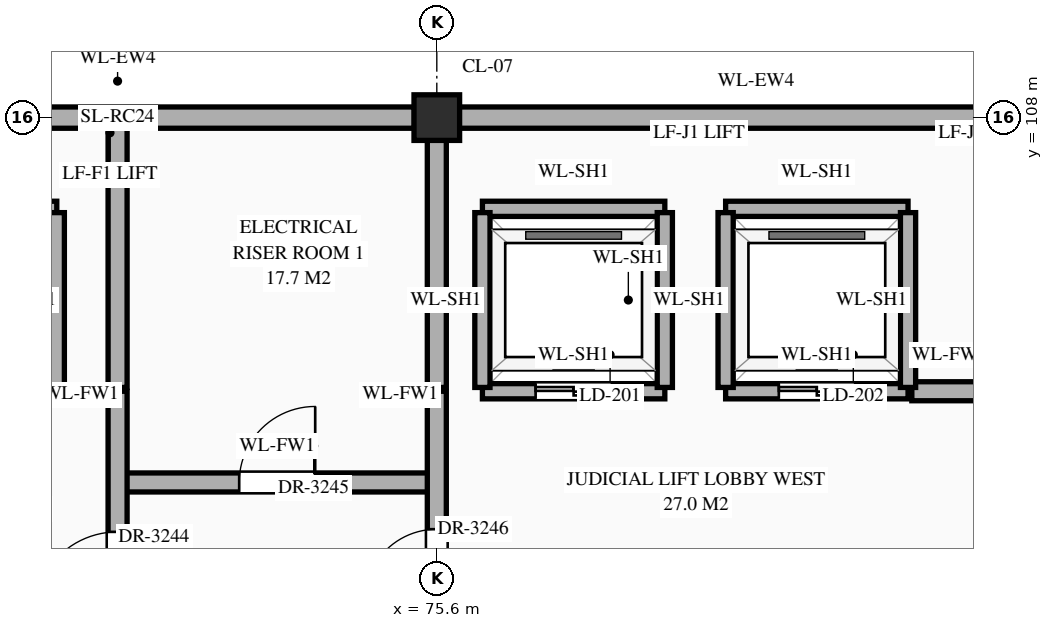
"""IFC4 building model, lengths in metres.
Left out: names, types, materials, properties, quantities, classifications, styles, units other than length and angle.
Written with IfcOpenShell. Run it as: python <this file> out.ifc"""

import sys

from ifc_helpers import new_model, si_unit, direction, frame, frame_2d, origin, origin_2d, place, context, subcontext, project, spatial, rectangle, extrude, element, fill, save


model = new_model("IFC4")
c1 = context("Model", 3, precision=1e-05, world=origin(), true_north=direction((0.0, 1.0)))
c2 = subcontext(c1, "Body", "Model", "MODEL_VIEW")
j1 = project(units=[si_unit("LENGTHUNIT", "METRE"), si_unit("PLANEANGLEUNIT", "RADIAN")], contexts=[c1])
p1 = place(None, origin())
s1 = spatial("IfcSite", under=j1, at=p1, CompositionType="ELEMENT")
p2 = place(p1, origin())
s2 = spatial("IfcBuilding", under=s1, at=p2, CompositionType="ELEMENT")
p3 = place(p2, frame((0.0, 0.0, 60.3)))
s3 = spatial("IfcBuildingStorey", under=s2, at=p3, CompositionType="ELEMENT", Elevation=60.3)
p4 = place(p3, frame((75.6, 108.0, 0.0), z_axis=(0.0, 0.0, 1.0), x_axis=(1.0, 0.0, 0.0)))
e1 = element("IfcColumn", 1, at=p4, inside=s3, PredefinedType="COLUMN", context=c2, shape_type="SweptSolid", body=[
    extrude(rectangle(XDim=0.6, YDim=0.6, at=origin_2d()), origin(), (0.0, 0.0, 1.0), 4.2),
])
p5 = place(p3, frame((67.495, 108.0, 0.0), z_axis=(0.0, 0.0, 1.0), x_axis=(1.0, 0.0, 0.0)))
e2 = element("IfcWall", 2, at=p5, inside=s3, PredefinedType="STANDARD", context=c2, shape_type="SweptSolid", body=[
    extrude(rectangle(XDim=7.81, YDim=0.28, at=frame_2d((3.905, 0.0))), origin(), (0.0, 0.0, 1.0), 3.31),
])
p6 = place(p3, frame((75.895, 108.0, 0.0), z_axis=(0.0, 0.0, 1.0), x_axis=(1.0, 0.0, 0.0)))
e3 = element("IfcWall", 3, at=p6, inside=s3, PredefinedType="STANDARD", context=c2, shape_type="SweptSolid", body=[
    extrude(rectangle(XDim=7.81, YDim=0.28, at=frame_2d((3.905, 0.0))), origin(), (0.0, 0.0, 1.0), 3.31),
])
p7 = place(p3, frame((71.4, 103.2, 0.0), z_axis=(0.0, 0.0, 1.0), x_axis=(1.0, 0.0, 0.0)))
e4 = element("IfcWall", 4, at=p7, inside=s3, PredefinedType="STANDARD", context=c2, shape_type="SweptSolid", body=[
    extrude(rectangle(XDim=4.2, YDim=0.25, at=frame_2d((2.1, 0.0))), origin(), (0.0, 0.0, 1.0), 3.96),
])
p8 = place(p7, frame((1.6, 0.0, 0.0)))
e5 = element("IfcOpeningElement", 5, at=p8, cuts=e4, PredefinedType="OPENING", context=c2, shape_type="SweptSolid", body=[
    extrude(rectangle(XDim=1.0, YDim=2.2, at=frame_2d((0.5, 1.1))), frame((0.0, 0.137, 0.0), z_axis=(0.0, -1.0, 0.0), x_axis=(1.0, 0.0, 0.0)), (0.0, 0.0, 1.0), 0.274),
])
p9 = place(p3, frame((67.6, 104.4, 0.0), z_axis=(0.0, 0.0, 1.0), x_axis=(1.0, 0.0, 0.0)))
e6 = element("IfcWall", 6, at=p9, inside=s3, PredefinedType="STANDARD", context=c2, shape_type="SweptSolid", body=[
    extrude(rectangle(XDim=3.0, YDim=0.2, at=frame_2d((1.5, 0.0))), origin(), (0.0, 0.0, 1.0), 3.96),
])
p10 = place(p9, frame((0.9, 0.0, 0.0)))
e7 = element("IfcOpeningElement", 7, at=p10, cuts=e6, PredefinedType="OPENING", context=c2, shape_type="SweptSolid", body=[
    extrude(rectangle(XDim=1.2, YDim=2.15, at=frame_2d((0.6, 1.075))), frame((0.0, 0.112, 0.0), z_axis=(0.0, -1.0, 0.0), x_axis=(1.0, 0.0, 0.0)), (0.0, 0.0, 1.0), 0.224),
])
p11 = place(p3, frame((76.2, 104.4, 0.0), z_axis=(0.0, 0.0, 1.0), x_axis=(1.0, 0.0, 0.0)))
e8 = element("IfcWall", 8, at=p11, inside=s3, PredefinedType="STANDARD", context=c2, shape_type="SweptSolid", body=[
    extrude(rectangle(XDim=2.4, YDim=0.2, at=frame_2d((1.2, 0.0))), origin(), (0.0, 0.0, 1.0), 3.96),
])
p12 = place(p11, frame((0.7, 0.0, 0.0)))
e9 = element("IfcOpeningElement", 9, at=p12, cuts=e8, PredefinedType="OPENING", context=c2, shape_type="SweptSolid", body=[
    extrude(rectangle(XDim=1.0, YDim=2.15, at=frame_2d((0.5, 1.075))), frame((0.0, 0.112, 0.0), z_axis=(0.0, -1.0, 0.0), x_axis=(1.0, 0.0, 0.0)), (0.0, 0.0, 1.0), 0.224),
])
p13 = place(p3, frame((79.4, 104.4, 0.0), z_axis=(0.0, 0.0, 1.0), x_axis=(1.0, 0.0, 0.0)))
e10 = element("IfcWall", 10, at=p13, inside=s3, PredefinedType="STANDARD", context=c2, shape_type="SweptSolid", body=[
    extrude(rectangle(XDim=2.4, YDim=0.2, at=frame_2d((1.2, 0.0))), origin(), (0.0, 0.0, 1.0), 3.96),
])
p14 = place(p13, frame((0.7, 0.0, 0.0)))
e11 = element("IfcOpeningElement", 11, at=p14, cuts=e10, PredefinedType="OPENING", context=c2, shape_type="SweptSolid", body=[
    extrude(rectangle(XDim=1.0, YDim=2.15, at=frame_2d((0.5, 1.075))), frame((0.0, 0.112, 0.0), z_axis=(0.0, -1.0, 0.0), x_axis=(1.0, 0.0, 0.0)), (0.0, 0.0, 1.0), 0.224),
])
p15 = place(p3, frame((81.85, 104.4, 0.0), z_axis=(0.0, 0.0, 1.0), x_axis=(1.0, 0.0, 0.0)))
e12 = element("IfcWall", 12, at=p15, inside=s3, PredefinedType="STANDARD", context=c2, shape_type="SweptSolid", body=[
    extrude(rectangle(XDim=2.1, YDim=0.25, at=frame_2d((1.05, 0.0))), origin(), (0.0, 0.0, 1.0), 3.96),
])
p16 = place(p3, frame((67.6, 106.8, 0.0), z_axis=(0.0, 0.0, 1.0), x_axis=(1.0, 0.0, 0.0)))
e13 = element("IfcWall", 13, at=p16, inside=s3, PredefinedType="STANDARD", context=c2, shape_type="SweptSolid", body=[
    extrude(rectangle(XDim=3.0, YDim=0.2, at=frame_2d((1.5, 0.0))), origin(), (0.0, 0.0, 1.0), 3.96),
])
for number, where, z_axis, x_axis in (
    (14, (76.2, 106.8, 0.0), (0.0, 0.0, 1.0), (1.0, 0.0, 0.0)),
    (15, (79.4, 106.8, 0.0), (0.0, 0.0, 1.0), (1.0, 0.0, 0.0)),
):
    element("IfcWall", number, at=place(p3, frame(where, z_axis=z_axis, x_axis=x_axis)), inside=s3, PredefinedType="STANDARD", context=c2, shape_type="SweptSolid", body=[
        extrude(rectangle(XDim=2.4, YDim=0.2, at=frame_2d((1.2, 0.0))), origin(), (0.0, 0.0, 1.0), 3.96),
    ])
p17 = place(p3, frame((70.6, 104.45, 0.0), z_axis=(0.0, 0.0, 1.0), x_axis=(0.0, 1.0, 0.0)))
e16 = element("IfcWall", 16, at=p17, inside=s3, PredefinedType="STANDARD", context=c2, shape_type="SweptSolid", body=[
    extrude(rectangle(XDim=2.3, YDim=0.2, at=frame_2d((1.15, 0.0))), origin(), (0.0, 0.0, 1.0), 3.96),
])
p18 = place(p3, frame((71.4, 100.8, 0.0), z_axis=(0.0, 0.0, 1.0), x_axis=(0.0, 1.0, 0.0)))
e17 = element("IfcWall", 17, at=p18, inside=s3, PredefinedType="STANDARD", context=c2, shape_type="SweptSolid", body=[
    extrude(rectangle(XDim=3.6, YDim=0.25, at=frame_2d((1.8, 0.0))), origin(), (0.0, 0.0, 1.0), 3.61),
])
p19 = place(p18, frame((0.65, 0.0, 0.0)))
e18 = element("IfcOpeningElement", 18, at=p19, cuts=e17, PredefinedType="OPENING", context=c2, shape_type="SweptSolid", body=[
    extrude(rectangle(XDim=1.1, YDim=2.2, at=frame_2d((0.55, 1.1))), frame((0.0, 0.137, 0.0), z_axis=(0.0, -1.0, 0.0), x_axis=(1.0, 0.0, 0.0)), (0.0, 0.0, 1.0), 0.274),
])
p20 = place(p3, frame((71.4, 104.45, 0.0), z_axis=(0.0, 0.0, 1.0), x_axis=(0.0, 1.0, 0.0)))
e19 = element("IfcWall", 19, at=p20, inside=s3, PredefinedType="STANDARD", context=c2, shape_type="SweptSolid", body=[
    extrude(rectangle(XDim=3.46, YDim=0.25, at=frame_2d((1.73, 0.0))), origin(), (0.0, 0.0, 1.0), 3.61),
])
p21 = place(p3, frame((75.6, 100.8, 0.0), z_axis=(0.0, 0.0, 1.0), x_axis=(0.0, 1.0, 0.0)))
e20 = element("IfcWall", 20, at=p21, inside=s3, PredefinedType="STANDARD", context=c2, shape_type="SweptSolid", body=[
    extrude(rectangle(XDim=3.6, YDim=0.25, at=frame_2d((1.8, 0.0))), origin(), (0.0, 0.0, 1.0), 3.21),
])
p22 = place(p21, frame((0.835, 0.0, 0.0)))
e21 = element("IfcOpeningElement", 21, at=p22, cuts=e20, PredefinedType="OPENING", context=c2, shape_type="SweptSolid", body=[
    extrude(rectangle(XDim=0.95, YDim=2.15, at=frame_2d((0.475, 1.075))), frame((0.0, 0.137, 0.0), z_axis=(0.0, -1.0, 0.0), x_axis=(1.0, 0.0, 0.0)), (0.0, 0.0, 1.0), 0.274),
])
p23 = place(p3, frame((75.6, 104.45, 0.0), z_axis=(0.0, 0.0, 1.0), x_axis=(0.0, 1.0, 0.0)))
e22 = element("IfcWall", 22, at=p23, inside=s3, PredefinedType="STANDARD", context=c2, shape_type="SweptSolid", body=[
    extrude(rectangle(XDim=3.46, YDim=0.25, at=frame_2d((1.73, 0.0))), origin(), (0.0, 0.0, 1.0), 3.21),
])
for number, where, z_axis, x_axis in (
    (23, (76.2, 104.45, 0.0), (0.0, 0.0, 1.0), (0.0, 1.0, 0.0)),
    (24, (78.6, 104.45, 0.0), (0.0, 0.0, 1.0), (0.0, 1.0, 0.0)),
    (25, (79.4, 104.45, 0.0), (0.0, 0.0, 1.0), (0.0, 1.0, 0.0)),
    (26, (81.8, 104.45, 0.0), (0.0, 0.0, 1.0), (0.0, 1.0, 0.0)),
):
    element("IfcWall", number, at=place(p3, frame(where, z_axis=z_axis, x_axis=x_axis)), inside=s3, PredefinedType="STANDARD", context=c2, shape_type="SweptSolid", body=[
        extrude(rectangle(XDim=2.3, YDim=0.2, at=frame_2d((1.15, 0.0))), origin(), (0.0, 0.0, 1.0), 3.96),
    ])
p24 = place(p12, origin())
e27 = element("IfcDoor", 27, at=p24, inside=s3, OperationType="DOUBLE_DOOR_SLIDING", PredefinedType="DOOR", context=c2, shape_type="SweptSolid", body=[
    extrude(rectangle(XDim=1.0, YDim=2.15, at=frame_2d((0.5, 1.075))), frame((0.0, 0.025, 0.0), z_axis=(0.0, -1.0, 0.0), x_axis=(1.0, 0.0, 0.0)), (0.0, 0.0, 1.0), 0.05),
])
fill(e9, e27)
p25 = place(p14, origin())
e28 = element("IfcDoor", 28, at=p25, inside=s3, OperationType="DOUBLE_DOOR_SLIDING", PredefinedType="DOOR", context=c2, shape_type="SweptSolid", body=[
    extrude(rectangle(XDim=1.0, YDim=2.15, at=frame_2d((0.5, 1.075))), frame((0.0, 0.025, 0.0), z_axis=(0.0, -1.0, 0.0), x_axis=(1.0, 0.0, 0.0)), (0.0, 0.0, 1.0), 0.05),
])
fill(e11, e28)
p26 = place(p19, origin())
e29 = element("IfcDoor", 29, at=p26, inside=s3, OperationType="SINGLE_SWING_LEFT", PredefinedType="DOOR", context=c2, shape_type="SweptSolid", body=[
    extrude(rectangle(XDim=1.1, YDim=2.2, at=frame_2d((0.55, 1.1))), frame((0.0, 0.025, 0.0), z_axis=(0.0, -1.0, 0.0), x_axis=(1.0, 0.0, 0.0)), (0.0, 0.0, 1.0), 0.05),
])
fill(e18, e29)
p27 = place(p8, origin())
e30 = element("IfcDoor", 30, at=p27, inside=s3, OperationType="SINGLE_SWING_RIGHT", PredefinedType="DOOR", context=c2, shape_type="SweptSolid", body=[
    extrude(rectangle(XDim=1.0, YDim=2.2, at=frame_2d((0.5, 1.1))), frame((0.0, 0.025, 0.0), z_axis=(0.0, -1.0, 0.0), x_axis=(1.0, 0.0, 0.0)), (0.0, 0.0, 1.0), 0.05),
])
fill(e5, e30)
p28 = place(p22, origin())
e31 = element("IfcDoor", 31, at=p28, inside=s3, OperationType="SINGLE_SWING_LEFT", PredefinedType="DOOR", context=c2, shape_type="SweptSolid", body=[
    extrude(rectangle(XDim=0.95, YDim=2.15, at=frame_2d((0.475, 1.075))), frame((0.0, 0.025, 0.0), z_axis=(0.0, -1.0, 0.0), x_axis=(1.0, 0.0, 0.0)), (0.0, 0.0, 1.0), 0.05),
])
fill(e21, e31)
save(model, sys.argv[1])
